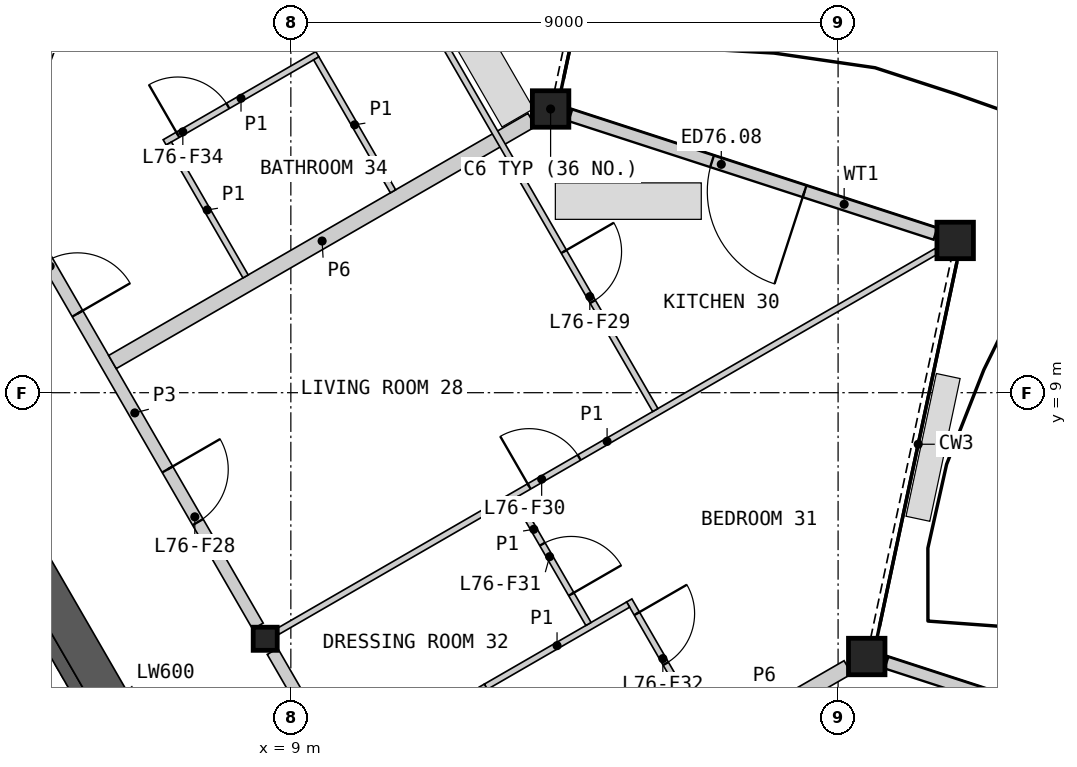
"""IFC4 building model, lengths in metres.
Left out: names, types, materials, properties, quantities, classifications, styles, units other than length and angle.
Written with IfcOpenShell. Run it as: python <this file> out.ifc"""

import sys

from ifc_helpers import new_model, si_unit, direction, frame, frame_2d, origin, origin_2d, place, context, subcontext, project, spatial, polyline, rectangle, hollow_rectangle, i_section, outline, extrude, element, fill, save


model = new_model("IFC4")
c1 = context("Model", 3, precision=1e-05, world=origin(), true_north=direction((0.0, 1.0)))
c2 = subcontext(c1, "Body", "Model", "MODEL_VIEW")
j1 = project(units=[si_unit("LENGTHUNIT", "METRE"), si_unit("PLANEANGLEUNIT", "RADIAN")], contexts=[c1])
p1 = place(None, origin())
s1 = spatial("IfcSite", under=j1, at=p1, CompositionType="ELEMENT")
p2 = place(p1, origin())
s2 = spatial("IfcBuilding", under=s1, at=p2, CompositionType="ELEMENT")
p3 = place(p2, frame((0.0, 0.0, 339.2)))
s3 = spatial("IfcBuildingStorey", under=s2, at=p3, CompositionType="ELEMENT", Elevation=339.2)
for number, where, z_axis, x_axis in (
    (1, (18.471, 4.661, 0.0), (0.0, 0.0, 1.0), (1.0, 0.0, 0.0)),
    (2, (19.926, 11.504, 0.0), (0.0, 0.0, 1.0), (1.0, 0.0, 0.0)),
    (3, (13.272, 13.666, 0.0), (0.0, 0.0, 1.0), (1.0, 0.0, 0.0)),
):
    element("IfcColumn", number, at=place(p3, frame(where, z_axis=z_axis, x_axis=x_axis)), inside=s3, PredefinedType="COLUMN", context=c2, shape_type="SweptSolid", body=[
        extrude(hollow_rectangle(XDim=0.6, YDim=0.6, WallThickness=0.04, at=origin_2d()), origin(), (0.0, 0.0, 1.0), 3.4),
    ])
p4 = place(p3, frame((8.578, 4.953, 0.0), z_axis=(0.0, 0.0, 1.0), x_axis=(1.0, 0.0, 0.0)))
e4 = element("IfcColumn", 4, at=p4, inside=s3, PredefinedType="COLUMN", context=c2, shape_type="SweptSolid", body=[
    extrude(i_section(OverallWidth=0.396, OverallDepth=0.381, WebThickness=0.019, FlangeThickness=0.03, at=origin_2d()), origin(), (0.0, 0.0, 1.0), 3.4),
])
p5 = place(p3, frame((24.798, 2.609, 0.0), z_axis=(0.0, 0.0, 1.0), x_axis=(-0.951065616977, 0.308988983952, 0.0)))
e5 = element("IfcWall", 5, at=p5, inside=s3, PredefinedType="SOLIDWALL", context=c2, shape_type="SweptSolid", body=[
    extrude(rectangle(XDim=6.312, YDim=0.2, at=frame_2d((3.156, 0.0))), origin(), (0.0, 0.0, 1.0), 2.488),
])
p6 = place(p5, frame((2.263, 0.0, 0.0)))
e6 = element("IfcOpeningElement", 6, at=p6, cuts=e5, PredefinedType="OPENING", context=c2, shape_type="SweptSolid", body=[
    extrude(rectangle(XDim=1.6, YDim=2.25, at=frame_2d((0.8, 1.125))), frame((0.0, 0.11, 0.0), z_axis=(0.0, -1.0, 0.0), x_axis=(1.0, 0.0, 0.0)), (0.0, 0.0, 1.0), 0.22),
])
p7 = place(p3, frame((19.601, 11.612, 0.0), z_axis=(0.0, 0.0, 1.0), x_axis=(-0.951065041052, 0.308990756638, 0.0)))
e7 = element("IfcWall", 7, at=p7, inside=s3, PredefinedType="SOLIDWALL", context=c2, shape_type="SweptSolid", body=[
    extrude(rectangle(XDim=6.313, YDim=0.2, at=frame_2d((3.156, 0.0))), origin(), (0.0, 0.0, 1.0), 2.488),
])
p8 = place(p7, frame((2.263, 0.0, 0.0)))
e8 = element("IfcOpeningElement", 8, at=p8, cuts=e7, PredefinedType="OPENING", context=c2, shape_type="SweptSolid", body=[
    extrude(rectangle(XDim=1.6, YDim=2.25, at=frame_2d((0.8, 1.125))), frame((0.0, 0.11, 0.0), z_axis=(0.0, -1.0, 0.0), x_axis=(1.0, 0.0, 0.0)), (0.0, 0.0, 1.0), 0.22),
])
p9 = place(p3, origin())
e9 = element("IfcWall", 9, at=p9, inside=s3, PredefinedType="SHEAR", context=c2, shape_type="SweptSolid", body=[
    extrude(outline(polyline([(1.561, 6.097), (3.731, 7.35), (8.231, -0.444), (6.061, -1.697), (5.96, -1.524), (7.952, -0.374), (6.952, 1.358), (4.96, 0.208), (4.861, 0.381), (6.852, 1.531), (5.852, 3.263), (3.861, 2.113), (3.76, 2.287), (5.752, 3.437), (4.752, 5.169), (2.76, 4.019), (2.66, 4.192), (4.652, 5.342), (3.652, 7.074), (1.66, 5.924), (1.561, 6.097)])), origin(), (0.0, 0.0, 1.0), 3.1),
])
p10 = place(p3, frame((5.817, -1.476, 0.0), z_axis=(0.0, 0.0, 1.0), x_axis=(-0.500002616675, 0.866023893041, 0.0)))
e10 = element("IfcWall", 10, at=p10, inside=s3, PredefinedType="SOLIDWALL", context=c2, shape_type="SweptSolid", body=[
    extrude(rectangle(XDim=8.373, YDim=0.2, at=frame_2d((4.187, 0.0))), origin(), (0.0, 0.0, 1.0), 3.1),
])
p11 = place(p10, frame((0.337, 0.0, 0.0)))
e11 = element("IfcOpeningElement", 11, at=p11, cuts=e10, PredefinedType="OPENING", context=c2, shape_type="SweptSolid", body=[
    extrude(rectangle(XDim=1.1, YDim=2.1, at=frame_2d((0.55, 1.05))), frame((0.0, 0.11, 0.0), z_axis=(0.0, -1.0, 0.0), x_axis=(1.0, 0.0, 0.0)), (0.0, 0.0, 1.0), 0.22),
])
p12 = place(p10, frame((2.537, 0.0, 0.0)))
e12 = element("IfcOpeningElement", 12, at=p12, cuts=e10, PredefinedType="OPENING", context=c2, shape_type="SweptSolid", body=[
    extrude(rectangle(XDim=1.1, YDim=2.1, at=frame_2d((0.55, 1.05))), frame((0.0, 0.11, 0.0), z_axis=(0.0, -1.0, 0.0), x_axis=(1.0, 0.0, 0.0)), (0.0, 0.0, 1.0), 0.22),
])
p13 = place(p10, frame((4.737, 0.0, 0.0)))
e13 = element("IfcOpeningElement", 13, at=p13, cuts=e10, PredefinedType="OPENING", context=c2, shape_type="SweptSolid", body=[
    extrude(rectangle(XDim=1.1, YDim=2.1, at=frame_2d((0.55, 1.05))), frame((0.0, 0.11, 0.0), z_axis=(0.0, -1.0, 0.0), x_axis=(1.0, 0.0, 0.0)), (0.0, 0.0, 1.0), 0.22),
])
p14 = place(p10, frame((7.037, 0.0, 0.0)))
e14 = element("IfcOpeningElement", 14, at=p14, cuts=e10, PredefinedType="OPENING", context=c2, shape_type="SweptSolid", body=[
    extrude(rectangle(XDim=0.9, YDim=2.1, at=frame_2d((0.45, 1.05))), frame((0.0, 0.11, 0.0), z_axis=(0.0, -1.0, 0.0), x_axis=(1.0, 0.0, 0.0)), (0.0, 0.0, 1.0), 0.22),
])
p15 = place(p3, frame((8.686, -0.634, 0.0), z_axis=(0.0, 0.0, 1.0), x_axis=(-0.50001836461, 0.866014800712, 0.0)))
e15 = element("IfcWall", 15, at=p15, inside=s3, PredefinedType="SHEAR", context=c2, shape_type="SweptSolid", body=[
    extrude(rectangle(XDim=10.451, YDim=0.6, at=frame_2d((5.225, 0.0))), origin(), (0.0, 0.0, 1.0), 3.1),
])
p16 = place(p3, frame((4.409, 12.174, 0.0), z_axis=(0.0, 0.0, 1.0), x_axis=(0.499984266882, -0.866034487114, 0.0)))
e16 = element("IfcWall", 16, at=p16, inside=s3, PredefinedType="PARTITIONING", context=c2, shape_type="SweptSolid", body=[
    extrude(rectangle(XDim=8.099, YDim=0.2, at=frame_2d((4.049, 0.0))), origin(), (0.0, 0.0, 1.0), 3.1),
])
p17 = place(p16, frame((5.123, 0.0, 0.0)))
e17 = element("IfcOpeningElement", 17, at=p17, cuts=e16, PredefinedType="OPENING", context=c2, shape_type="SweptSolid", body=[
    extrude(rectangle(XDim=1.0, YDim=2.1, at=frame_2d((0.5, 1.05))), frame((0.0, 0.11, 0.0), z_axis=(0.0, -1.0, 0.0), x_axis=(1.0, 0.0, 0.0)), (0.0, 0.0, 1.0), 0.22),
])
p18 = place(p16, frame((1.164, 0.0, 0.0)))
e18 = element("IfcOpeningElement", 18, at=p18, cuts=e16, PredefinedType="OPENING", context=c2, shape_type="SweptSolid", body=[
    extrude(rectangle(XDim=1.0, YDim=2.1, at=frame_2d((0.5, 1.05))), frame((0.0, 0.11, 0.0), z_axis=(0.0, -1.0, 0.0), x_axis=(1.0, 0.0, 0.0)), (0.0, 0.0, 1.0), 0.22),
])
p19 = place(p3, frame((8.698, 4.745, 0.0), z_axis=(0.0, 0.0, 1.0), x_axis=(0.499984266882, -0.866034487114, 0.0)))
e19 = element("IfcWall", 19, at=p19, inside=s3, PredefinedType="PARTITIONING", context=c2, shape_type="SweptSolid", body=[
    extrude(rectangle(XDim=8.099, YDim=0.2, at=frame_2d((4.049, 0.0))), origin(), (0.0, 0.0, 1.0), 3.1),
])
p20 = place(p19, frame((5.935, 0.0, 0.0)))
e20 = element("IfcOpeningElement", 20, at=p20, cuts=e19, PredefinedType="OPENING", context=c2, shape_type="SweptSolid", body=[
    extrude(rectangle(XDim=1.0, YDim=2.1, at=frame_2d((0.5, 1.05))), frame((0.0, 0.11, 0.0), z_axis=(0.0, -1.0, 0.0), x_axis=(1.0, 0.0, 0.0)), (0.0, 0.0, 1.0), 0.22),
])
p21 = place(p3, frame((6.066, 9.504, 0.0), z_axis=(0.0, 0.0, 1.0), x_axis=(0.866021168401, 0.500007335828, 0.0)))
e21 = element("IfcWall", 21, at=p21, inside=s3, PredefinedType="PARTITIONING", context=c2, shape_type="SweptSolid", body=[
    extrude(rectangle(XDim=7.962, YDim=0.25, at=frame_2d((3.981, 0.0))), origin(), (0.0, 0.0, 1.0), 2.33),
])
p22 = place(p3, frame((15.984, 3.227, 0.0), z_axis=(0.0, 0.0, 1.0), x_axis=(0.8660174017, 0.500013859761, 0.0)))
e22 = element("IfcWall", 22, at=p22, inside=s3, PredefinedType="PARTITIONING", context=c2, shape_type="SweptSolid", body=[
    extrude(rectangle(XDim=2.514, YDim=0.25, at=frame_2d((1.257, 0.0))), origin(), (0.0, 0.0, 1.0), 2.33),
])
p23 = place(p3, frame((3.468, 14.005, 0.0), z_axis=(0.0, 0.0, 1.0), x_axis=(0.866020616849, 0.500008291124, 0.0)))
e23 = element("IfcWall", 23, at=p23, inside=s3, PredefinedType="PARTITIONING", context=c2, shape_type="SweptSolid", body=[
    extrude(rectangle(XDim=12.643, YDim=0.1, at=frame_2d((6.321, 0.0))), origin(), (0.0, 0.0, 1.0), 2.33),
])
p24 = place(p23, frame((8.115, 0.0, 0.0)))
e24 = element("IfcOpeningElement", 24, at=p24, cuts=e23, PredefinedType="OPENING", context=c2, shape_type="SweptSolid", body=[
    extrude(rectangle(XDim=0.95, YDim=2.1, at=frame_2d((0.475, 1.05))), frame((0.0, 0.06, 0.0), z_axis=(0.0, -1.0, 0.0), x_axis=(1.0, 0.0, 0.0)), (0.0, 0.0, 1.0), 0.12),
])
p25 = place(p3, frame((8.786, 5.073, 0.0), z_axis=(0.0, 0.0, 1.0), x_axis=(0.86602139559, 0.500006942333, 0.0)))
e25 = element("IfcWall", 25, at=p25, inside=s3, PredefinedType="PARTITIONING", context=c2, shape_type="SweptSolid", body=[
    extrude(rectangle(XDim=12.505, YDim=0.1, at=frame_2d((6.252, 0.0))), origin(), (0.0, 0.0, 1.0), 2.33),
])
p26 = place(p25, frame((4.772, 0.0, 0.0)))
e26 = element("IfcOpeningElement", 26, at=p26, cuts=e25, PredefinedType="OPENING", context=c2, shape_type="SweptSolid", body=[
    extrude(rectangle(XDim=0.95, YDim=2.1, at=frame_2d((0.475, 1.05))), frame((0.0, 0.06, 0.0), z_axis=(0.0, -1.0, 0.0), x_axis=(1.0, 0.0, 0.0)), (0.0, 0.0, 1.0), 0.12),
])
p27 = place(p3, frame((9.846, 17.63, 0.0), z_axis=(0.0, 0.0, 1.0), x_axis=(0.500013259472, -0.866017748289, 0.0)))
e27 = element("IfcWall", 27, at=p27, inside=s3, PredefinedType="PARTITIONING", context=c2, shape_type="SweptSolid", body=[
    extrude(rectangle(XDim=10.295, YDim=0.1, at=frame_2d((5.147, 0.0))), origin(), (0.0, 0.0, 1.0), 2.33),
])
p28 = place(p27, frame((7.286, 0.0, 0.0)))
e28 = element("IfcOpeningElement", 28, at=p28, cuts=e27, PredefinedType="OPENING", context=c2, shape_type="SweptSolid", body=[
    extrude(rectangle(XDim=0.95, YDim=2.1, at=frame_2d((0.475, 1.05))), frame((0.0, 0.06, 0.0), z_axis=(0.0, -1.0, 0.0), x_axis=(1.0, 0.0, 0.0)), (0.0, 0.0, 1.0), 0.12),
])
p29 = place(p27, frame((0.954, 0.0, 0.0)))
e29 = element("IfcOpeningElement", 29, at=p29, cuts=e27, PredefinedType="OPENING", context=c2, shape_type="SweptSolid", body=[
    extrude(rectangle(XDim=0.95, YDim=2.1, at=frame_2d((0.475, 1.05))), frame((0.0, 0.06, 0.0), z_axis=(0.0, -1.0, 0.0), x_axis=(1.0, 0.0, 0.0)), (0.0, 0.0, 1.0), 0.12),
])
p30 = place(p3, frame((14.565, 5.583, 0.0), z_axis=(0.0, 0.0, 1.0), x_axis=(0.499996545922, -0.866027397988, 0.0)))
e30 = element("IfcWall", 30, at=p30, inside=s3, PredefinedType="PARTITIONING", context=c2, shape_type="SweptSolid", body=[
    extrude(rectangle(XDim=5.5, YDim=0.1, at=frame_2d((2.75, 0.0))), origin(), (0.0, 0.0, 1.0), 2.33),
])
p31 = place(p30, frame((0.25, 0.0, 0.0)))
e31 = element("IfcOpeningElement", 31, at=p31, cuts=e30, PredefinedType="OPENING", context=c2, shape_type="SweptSolid", body=[
    extrude(rectangle(XDim=0.95, YDim=2.1, at=frame_2d((0.475, 1.05))), frame((0.0, 0.06, 0.0), z_axis=(0.0, -1.0, 0.0), x_axis=(1.0, 0.0, 0.0)), (0.0, 0.0, 1.0), 0.12),
])
p32 = place(p3, frame((12.14, 4.183, 0.0), z_axis=(0.0, 0.0, 1.0), x_axis=(0.499996545922, -0.866027397988, 0.0)))
e32 = element("IfcWall", 32, at=p32, inside=s3, PredefinedType="PARTITIONING", context=c2, shape_type="SweptSolid", body=[
    extrude(rectangle(XDim=5.5, YDim=0.1, at=frame_2d((2.75, 0.0))), origin(), (0.0, 0.0, 1.0), 2.33),
])
p33 = place(p3, frame((6.925, 13.117, 0.0), z_axis=(0.0, 0.0, 1.0), x_axis=(0.866011727401, 0.500023687443, 0.0)))
e33 = element("IfcWall", 33, at=p33, inside=s3, PredefinedType="PARTITIONING", context=c2, shape_type="SweptSolid", body=[
    extrude(rectangle(XDim=2.9, YDim=0.1, at=frame_2d((1.45, 0.0))), origin(), (0.0, 0.0, 1.0), 2.33),
])
p34 = place(p33, frame((0.25, 0.0, 0.0)))
e34 = element("IfcOpeningElement", 34, at=p34, cuts=e33, PredefinedType="OPENING", context=c2, shape_type="SweptSolid", body=[
    extrude(rectangle(XDim=0.95, YDim=2.1, at=frame_2d((0.475, 1.05))), frame((0.0, 0.06, 0.0), z_axis=(0.0, -1.0, 0.0), x_axis=(1.0, 0.0, 0.0)), (0.0, 0.0, 1.0), 0.12),
])
p35 = place(p3, frame((12.209, 4.165, 0.0), z_axis=(0.0, 0.0, 1.0), x_axis=(0.866019956843, 0.50000943426, 0.0)))
e35 = element("IfcWall", 35, at=p35, inside=s3, PredefinedType="PARTITIONING", context=c2, shape_type="SweptSolid", body=[
    extrude(rectangle(XDim=2.7, YDim=0.1, at=frame_2d((1.35, 0.0))), origin(), (0.0, 0.0, 1.0), 2.33),
])
p36 = place(p3, frame((9.418, 14.499, 0.0), z_axis=(0.0, 0.0, 1.0), x_axis=(0.500090717682, -0.865973021571, 0.0)))
e36 = element("IfcWall", 36, at=p36, inside=s3, PredefinedType="PARTITIONING", context=c2, shape_type="SweptSolid", body=[
    extrude(rectangle(XDim=2.525, YDim=0.1, at=frame_2d((1.262, 0.0))), origin(), (0.0, 0.0, 1.0), 2.33),
])
p37 = place(p3, frame((6.993, 13.099, 0.0), z_axis=(0.0, 0.0, 1.0), x_axis=(0.500048846702, -0.865997200291, 0.0)))
e37 = element("IfcWall", 37, at=p37, inside=s3, PredefinedType="PARTITIONING", context=c2, shape_type="SweptSolid", body=[
    extrude(rectangle(XDim=2.525, YDim=0.1, at=frame_2d((1.263, 0.0))), origin(), (0.0, 0.0, 1.0), 2.33),
])
p38 = place(p3, frame((12.696, 7.272, 0.0), z_axis=(0.0, 0.0, 1.0), x_axis=(0.500016292001, -0.866015997389, 0.0)))
e38 = element("IfcWall", 38, at=p38, inside=s3, PredefinedType="PARTITIONING", context=c2, shape_type="SweptSolid", body=[
    extrude(rectangle(XDim=2.397, YDim=0.1, at=frame_2d((1.199, 0.0))), origin(), (0.0, 0.0, 1.0), 2.33),
])
p39 = place(p38, frame((0.882, 0.0, 0.0)))
e39 = element("IfcOpeningElement", 39, at=p39, cuts=e38, PredefinedType="OPENING", context=c2, shape_type="SweptSolid", body=[
    extrude(rectangle(XDim=0.95, YDim=2.1, at=frame_2d((0.475, 1.05))), frame((0.0, 0.06, 0.0), z_axis=(0.0, -1.0, 0.0), x_axis=(1.0, 0.0, 0.0)), (0.0, 0.0, 1.0), 0.12),
])
p40 = place(p8, origin())
e40 = element("IfcDoor", 40, at=p40, inside=s3, OperationType="DOUBLE_DOOR_SINGLE_SWING", PredefinedType="DOOR", context=c2, shape_type="SweptSolid", body=[
    extrude(rectangle(XDim=1.6, YDim=2.25, at=frame_2d((0.8, 1.125))), frame((0.0, 0.025, 0.0), z_axis=(0.0, -1.0, 0.0), x_axis=(1.0, 0.0, 0.0)), (0.0, 0.0, 1.0), 0.05),
])
fill(e8, e40)
p41 = place(p17, origin())
e41 = element("IfcDoor", 41, at=p41, inside=s3, OperationType="SINGLE_SWING_LEFT", PredefinedType="DOOR", context=c2, shape_type="SweptSolid", body=[
    extrude(rectangle(XDim=1.0, YDim=2.1, at=frame_2d((0.5, 1.05))), frame((0.0, 0.025, 0.0), z_axis=(0.0, -1.0, 0.0), x_axis=(1.0, 0.0, 0.0)), (0.0, 0.0, 1.0), 0.05),
])
fill(e17, e41)
p42 = place(p28, origin())
e42 = element("IfcDoor", 42, at=p42, inside=s3, OperationType="SINGLE_SWING_LEFT", PredefinedType="DOOR", context=c2, shape_type="SweptSolid", body=[
    extrude(rectangle(XDim=0.95, YDim=2.1, at=frame_2d((0.475, 1.05))), frame((0.0, 0.025, 0.0), z_axis=(0.0, -1.0, 0.0), x_axis=(1.0, 0.0, 0.0)), (0.0, 0.0, 1.0), 0.05),
])
fill(e28, e42)
p43 = place(p26, origin())
e43 = element("IfcDoor", 43, at=p43, inside=s3, OperationType="SINGLE_SWING_LEFT", PredefinedType="DOOR", context=c2, shape_type="SweptSolid", body=[
    extrude(rectangle(XDim=0.95, YDim=2.1, at=frame_2d((0.475, 1.05))), frame((0.0, 0.025, 0.0), z_axis=(0.0, -1.0, 0.0), x_axis=(1.0, 0.0, 0.0)), (0.0, 0.0, 1.0), 0.05),
])
fill(e26, e43)
p44 = place(p39, origin())
e44 = element("IfcDoor", 44, at=p44, inside=s3, OperationType="SINGLE_SWING_RIGHT", PredefinedType="DOOR", context=c2, shape_type="SweptSolid", body=[
    extrude(rectangle(XDim=0.95, YDim=2.1, at=frame_2d((0.475, 1.05))), frame((0.0, 0.025, 0.0), z_axis=(0.0, -1.0, 0.0), x_axis=(1.0, 0.0, 0.0)), (0.0, 0.0, 1.0), 0.05),
])
fill(e39, e44)
p45 = place(p31, origin())
e45 = element("IfcDoor", 45, at=p45, inside=s3, OperationType="SINGLE_SWING_LEFT", PredefinedType="DOOR", context=c2, shape_type="SweptSolid", body=[
    extrude(rectangle(XDim=0.95, YDim=2.1, at=frame_2d((0.475, 1.05))), frame((0.0, 0.025, 0.0), z_axis=(0.0, -1.0, 0.0), x_axis=(1.0, 0.0, 0.0)), (0.0, 0.0, 1.0), 0.05),
])
fill(e31, e45)
p46 = place(p18, origin())
e46 = element("IfcDoor", 46, at=p46, inside=s3, OperationType="SINGLE_SWING_RIGHT", PredefinedType="DOOR", context=c2, shape_type="SweptSolid", body=[
    extrude(rectangle(XDim=1.0, YDim=2.1, at=frame_2d((0.5, 1.05))), frame((0.0, 0.025, 0.0), z_axis=(0.0, -1.0, 0.0), x_axis=(1.0, 0.0, 0.0)), (0.0, 0.0, 1.0), 0.05),
])
fill(e18, e46)
p47 = place(p34, origin())
e47 = element("IfcDoor", 47, at=p47, inside=s3, OperationType="SINGLE_SWING_LEFT", PredefinedType="DOOR", context=c2, shape_type="SweptSolid", body=[
    extrude(rectangle(XDim=0.95, YDim=2.1, at=frame_2d((0.475, 1.05))), frame((0.0, 0.025, 0.0), z_axis=(0.0, -1.0, 0.0), x_axis=(1.0, 0.0, 0.0)), (0.0, 0.0, 1.0), 0.05),
])
fill(e34, e47)
save(model, sys.argv[1])
